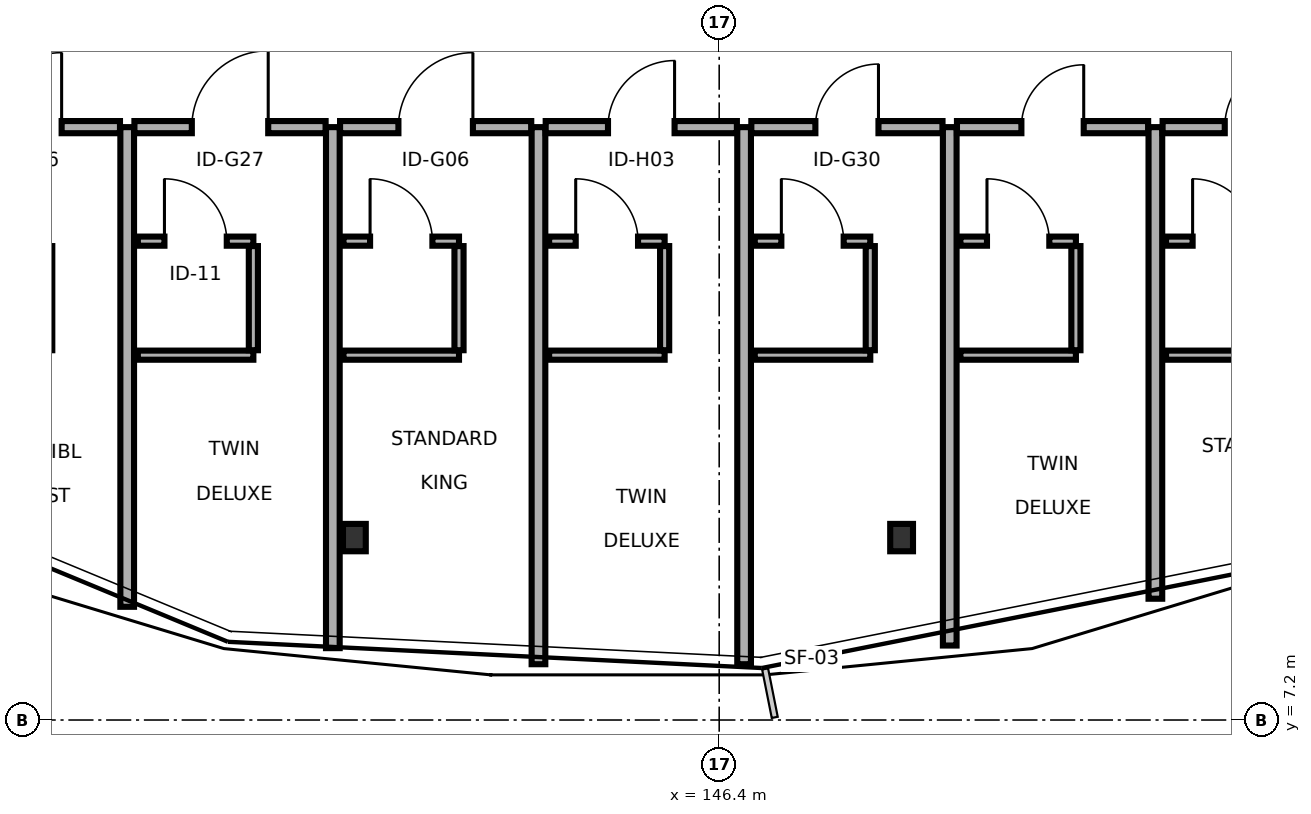
"""IFC4 building model, lengths in metres.
Left out: names, types, materials, properties, quantities, classifications, styles, units other than length and angle.
Written with IfcOpenShell. Run it as: python <this file> out.ifc"""

import sys

from ifc_helpers import new_model, si_unit, direction, frame, frame_2d, origin, origin_2d, place, context, subcontext, project, spatial, rectangle, i_section, extrude, element, fill, save


model = new_model("IFC4")
c1 = context("Model", 3, precision=1e-05, world=origin(), true_north=direction((0.0, 1.0)))
c2 = subcontext(c1, "Body", "Model", "MODEL_VIEW")
j1 = project(units=[si_unit("LENGTHUNIT", "METRE"), si_unit("PLANEANGLEUNIT", "RADIAN")], contexts=[c1])
p1 = place(None, origin())
s1 = spatial("IfcSite", under=j1, at=p1, CompositionType="ELEMENT")
p2 = place(p1, origin())
s2 = spatial("IfcBuilding", under=s1, at=p2, CompositionType="ELEMENT")
p3 = place(p2, frame((0.0, 0.0, 38.5)))
s3 = spatial("IfcBuildingStorey", under=s2, at=p3, CompositionType="ELEMENT", Elevation=38.5)
for number, where, z_axis, x_axis in (
    (1, (141.6, 9.6, 0.0), (0.0, 0.0, 1.0), (1.0, 0.0, 0.0)),
    (2, (148.8, 9.6, 0.0), (0.0, 0.0, 1.0), (1.0, 0.0, 0.0)),
):
    element("IfcColumn", number, at=place(p3, frame(where, z_axis=z_axis, x_axis=x_axis)), inside=s3, PredefinedType="COLUMN", context=c2, shape_type="SweptSolid", body=[
        extrude(i_section(OverallWidth=0.3, OverallDepth=0.36, WebThickness=0.012, FlangeThickness=0.022, FilletRadius=0.027, at=origin_2d()), origin(), (0.0, 0.0, 1.0), 3.4),
    ])
p4 = place(p3, frame((136.0, 15.0, 0.0), z_axis=(0.0, 0.0, 1.0), x_axis=(1.0, 0.0, 0.0)))
e3 = element("IfcWall", 3, at=p4, inside=s3, PredefinedType="PARTITIONING", context=c2, shape_type="SweptSolid", body=[
    extrude(rectangle(XDim=2.516, YDim=0.16, at=frame_2d((1.258, 0.0))), origin(), (0.0, 0.0, 1.0), 2.735),
])
p5 = place(p4, frame((0.768, 0.0, 0.0)))
e4 = element("IfcOpeningElement", 4, at=p5, cuts=e3, PredefinedType="OPENING", context=c2, shape_type="SweptSolid", body=[
    extrude(rectangle(XDim=0.98, YDim=2.17, at=frame_2d((0.49, 1.085))), frame((0.0, 0.09, 0.0), z_axis=(0.0, -1.0, 0.0), x_axis=(1.0, 0.0, 0.0)), (0.0, 0.0, 1.0), 0.18),
])
p6 = place(p3, frame((137.566, 12.065, 0.0), z_axis=(0.0, 0.0, 1.0), x_axis=(0.0, 1.0, 0.0)))
e5 = element("IfcWall", 5, at=p6, inside=s3, PredefinedType="PARTITIONING", context=c2, shape_type="SweptSolid", body=[
    extrude(rectangle(XDim=1.37, YDim=0.12, at=frame_2d((0.685, 0.0))), origin(), (0.0, 0.0, 1.0), 3.15),
])
p7 = place(p3, frame((138.611, 8.689, 0.0), z_axis=(0.0, 0.0, 1.0), x_axis=(0.0, 1.0, 0.0)))
e6 = element("IfcWall", 6, at=p7, inside=s3, PredefinedType="PARTITIONING", context=c2, shape_type="SweptSolid", body=[
    extrude(rectangle(XDim=6.311, YDim=0.18, at=frame_2d((3.155, 0.0))), origin(), (0.0, 0.0, 1.0), 2.695),
])
p8 = place(p3, frame((138.706, 15.0, 0.0), z_axis=(0.0, 0.0, 1.0), x_axis=(1.0, 0.0, 0.0)))
e7 = element("IfcWall", 7, at=p8, inside=s3, PredefinedType="PARTITIONING", context=c2, shape_type="SweptSolid", body=[
    extrude(rectangle(XDim=2.516, YDim=0.16, at=frame_2d((1.258, 0.0))), origin(), (0.0, 0.0, 1.0), 3.15),
])
p9 = place(p8, frame((0.755, 0.0, 0.0)))
e8 = element("IfcOpeningElement", 8, at=p9, cuts=e7, PredefinedType="OPENING", context=c2, shape_type="SweptSolid", body=[
    extrude(rectangle(XDim=1.005, YDim=2.17, at=frame_2d((0.502, 1.085))), frame((0.0, 0.09, 0.0), z_axis=(0.0, -1.0, 0.0), x_axis=(1.0, 0.0, 0.0)), (0.0, 0.0, 1.0), 0.18),
])
p10 = place(p3, frame((138.751, 12.0, 0.0), z_axis=(0.0, 0.0, 1.0), x_axis=(1.0, 0.0, 0.0)))
e9 = element("IfcWall", 9, at=p10, inside=s3, PredefinedType="PARTITIONING", context=c2, shape_type="SweptSolid", body=[
    extrude(rectangle(XDim=1.52, YDim=0.12, at=frame_2d((0.76, 0.0))), origin(), (0.0, 0.0, 1.0), 3.15),
])
p11 = place(p3, frame((138.751, 13.5, 0.0), z_axis=(0.0, 0.0, 1.0), x_axis=(1.0, 0.0, 0.0)))
e10 = element("IfcWall", 10, at=p11, inside=s3, PredefinedType="PARTITIONING", context=c2, shape_type="SweptSolid", body=[
    extrude(rectangle(XDim=1.52, YDim=0.12, at=frame_2d((0.76, 0.0))), origin(), (0.0, 0.0, 1.0), 3.15),
])
p12 = place(p11, frame((0.35, 0.0, 0.0)))
e11 = element("IfcOpeningElement", 11, at=p12, cuts=e10, PredefinedType="OPENING", context=c2, shape_type="SweptSolid", body=[
    extrude(rectangle(XDim=0.82, YDim=2.08, at=frame_2d((0.41, 1.04))), frame((0.0, 0.07, 0.0), z_axis=(0.0, -1.0, 0.0), x_axis=(1.0, 0.0, 0.0)), (0.0, 0.0, 1.0), 0.14),
])
p13 = place(p3, frame((140.271, 12.065, 0.0), z_axis=(0.0, 0.0, 1.0), x_axis=(0.0, 1.0, 0.0)))
e12 = element("IfcWall", 12, at=p13, inside=s3, PredefinedType="PARTITIONING", context=c2, shape_type="SweptSolid", body=[
    extrude(rectangle(XDim=1.37, YDim=0.12, at=frame_2d((0.685, 0.0))), origin(), (0.0, 0.0, 1.0), 3.15),
])
p14 = place(p3, frame((141.317, 8.146, 0.0), z_axis=(0.0, 0.0, 1.0), x_axis=(0.0, 1.0, 0.0)))
e13 = element("IfcWall", 13, at=p14, inside=s3, PredefinedType="PARTITIONING", context=c2, shape_type="SweptSolid", body=[
    extrude(rectangle(XDim=6.854, YDim=0.18, at=frame_2d((3.427, 0.0))), origin(), (0.0, 0.0, 1.0), 2.695),
])
p15 = place(p3, frame((141.412, 15.0, 0.0), z_axis=(0.0, 0.0, 1.0), x_axis=(1.0, 0.0, 0.0)))
e14 = element("IfcWall", 14, at=p15, inside=s3, PredefinedType="PARTITIONING", context=c2, shape_type="SweptSolid", body=[
    extrude(rectangle(XDim=2.516, YDim=0.16, at=frame_2d((1.258, 0.0))), origin(), (0.0, 0.0, 1.0), 2.735),
])
p16 = place(p15, frame((0.768, 0.0, 0.0)))
e15 = element("IfcOpeningElement", 15, at=p16, cuts=e14, PredefinedType="OPENING", context=c2, shape_type="SweptSolid", body=[
    extrude(rectangle(XDim=0.98, YDim=2.05, at=frame_2d((0.49, 1.025))), frame((0.0, 0.09, 0.0), z_axis=(0.0, -1.0, 0.0), x_axis=(1.0, 0.0, 0.0)), (0.0, 0.0, 1.0), 0.18),
])
p17 = place(p3, frame((141.457, 12.0, 0.0), z_axis=(0.0, 0.0, 1.0), x_axis=(1.0, 0.0, 0.0)))
e16 = element("IfcWall", 16, at=p17, inside=s3, PredefinedType="PARTITIONING", context=c2, shape_type="SweptSolid", body=[
    extrude(rectangle(XDim=1.52, YDim=0.12, at=frame_2d((0.76, 0.0))), origin(), (0.0, 0.0, 1.0), 2.735),
])
p18 = place(p3, frame((141.457, 13.5, 0.0), z_axis=(0.0, 0.0, 1.0), x_axis=(1.0, 0.0, 0.0)))
e17 = element("IfcWall", 17, at=p18, inside=s3, PredefinedType="PARTITIONING", context=c2, shape_type="SweptSolid", body=[
    extrude(rectangle(XDim=1.52, YDim=0.12, at=frame_2d((0.76, 0.0))), origin(), (0.0, 0.0, 1.0), 2.735),
])
p19 = place(p18, frame((0.35, 0.0, 0.0)))
e18 = element("IfcOpeningElement", 18, at=p19, cuts=e17, PredefinedType="OPENING", context=c2, shape_type="SweptSolid", body=[
    extrude(rectangle(XDim=0.82, YDim=2.08, at=frame_2d((0.41, 1.04))), frame((0.0, 0.07, 0.0), z_axis=(0.0, -1.0, 0.0), x_axis=(1.0, 0.0, 0.0)), (0.0, 0.0, 1.0), 0.14),
])
p20 = place(p3, frame((142.977, 12.065, 0.0), z_axis=(0.0, 0.0, 1.0), x_axis=(0.0, 1.0, 0.0)))
e19 = element("IfcWall", 19, at=p20, inside=s3, PredefinedType="PARTITIONING", context=c2, shape_type="SweptSolid", body=[
    extrude(rectangle(XDim=1.37, YDim=0.12, at=frame_2d((0.685, 0.0))), origin(), (0.0, 0.0, 1.0), 3.15),
])
p21 = place(p3, frame((144.022, 7.934, 0.0), z_axis=(0.0, 0.0, 1.0), x_axis=(0.0, 1.0, 0.0)))
e20 = element("IfcWall", 20, at=p21, inside=s3, PredefinedType="PARTITIONING", context=c2, shape_type="SweptSolid", body=[
    extrude(rectangle(XDim=7.066, YDim=0.18, at=frame_2d((3.533, 0.0))), origin(), (0.0, 0.0, 1.0), 2.695),
])
p22 = place(p3, frame((144.117, 15.0, 0.0), z_axis=(0.0, 0.0, 1.0), x_axis=(1.0, 0.0, 0.0)))
e21 = element("IfcWall", 21, at=p22, inside=s3, PredefinedType="PARTITIONING", context=c2, shape_type="SweptSolid", body=[
    extrude(rectangle(XDim=2.516, YDim=0.16, at=frame_2d((1.258, 0.0))), origin(), (0.0, 0.0, 1.0), 3.15),
])
p23 = place(p22, frame((0.82, 0.0, 0.0)))
e22 = element("IfcOpeningElement", 22, at=p23, cuts=e21, PredefinedType="OPENING", context=c2, shape_type="SweptSolid", body=[
    extrude(rectangle(XDim=0.876, YDim=2.16, at=frame_2d((0.438, 1.08))), frame((0.0, 0.09, 0.0), z_axis=(0.0, -1.0, 0.0), x_axis=(1.0, 0.0, 0.0)), (0.0, 0.0, 1.0), 0.18),
])
p24 = place(p3, frame((144.162, 12.0, 0.0), z_axis=(0.0, 0.0, 1.0), x_axis=(1.0, 0.0, 0.0)))
e23 = element("IfcWall", 23, at=p24, inside=s3, PredefinedType="PARTITIONING", context=c2, shape_type="SweptSolid", body=[
    extrude(rectangle(XDim=1.52, YDim=0.12, at=frame_2d((0.76, 0.0))), origin(), (0.0, 0.0, 1.0), 3.15),
])
p25 = place(p3, frame((144.162, 13.5, 0.0), z_axis=(0.0, 0.0, 1.0), x_axis=(1.0, 0.0, 0.0)))
e24 = element("IfcWall", 24, at=p25, inside=s3, PredefinedType="PARTITIONING", context=c2, shape_type="SweptSolid", body=[
    extrude(rectangle(XDim=1.52, YDim=0.12, at=frame_2d((0.76, 0.0))), origin(), (0.0, 0.0, 1.0), 3.15),
])
p26 = place(p25, frame((0.35, 0.0, 0.0)))
e25 = element("IfcOpeningElement", 25, at=p26, cuts=e24, PredefinedType="OPENING", context=c2, shape_type="SweptSolid", body=[
    extrude(rectangle(XDim=0.82, YDim=2.08, at=frame_2d((0.41, 1.04))), frame((0.0, 0.07, 0.0), z_axis=(0.0, -1.0, 0.0), x_axis=(1.0, 0.0, 0.0)), (0.0, 0.0, 1.0), 0.14),
])
p27 = place(p3, frame((145.682, 12.065, 0.0), z_axis=(0.0, 0.0, 1.0), x_axis=(0.0, 1.0, 0.0)))
e26 = element("IfcWall", 26, at=p27, inside=s3, PredefinedType="PARTITIONING", context=c2, shape_type="SweptSolid", body=[
    extrude(rectangle(XDim=1.37, YDim=0.12, at=frame_2d((0.685, 0.0))), origin(), (0.0, 0.0, 1.0), 3.15),
])
p28 = place(p3, frame((146.728, 7.934, 0.0), z_axis=(0.0, 0.0, 1.0), x_axis=(0.0, 1.0, 0.0)))
e27 = element("IfcWall", 27, at=p28, inside=s3, PredefinedType="PARTITIONING", context=c2, shape_type="SweptSolid", body=[
    extrude(rectangle(XDim=7.066, YDim=0.18, at=frame_2d((3.533, 0.0))), origin(), (0.0, 0.0, 1.0), 2.695),
])
p29 = place(p3, frame((146.823, 15.0, 0.0), z_axis=(0.0, 0.0, 1.0), x_axis=(1.0, 0.0, 0.0)))
e28 = element("IfcWall", 28, at=p29, inside=s3, PredefinedType="PARTITIONING", context=c2, shape_type="SweptSolid", body=[
    extrude(rectangle(XDim=2.516, YDim=0.16, at=frame_2d((1.258, 0.0))), origin(), (0.0, 0.0, 1.0), 2.735),
])
p30 = place(p29, frame((0.843, 0.0, 0.0)))
e29 = element("IfcOpeningElement", 29, at=p30, cuts=e28, PredefinedType="OPENING", context=c2, shape_type="SweptSolid", body=[
    extrude(rectangle(XDim=0.83, YDim=2.23, at=frame_2d((0.415, 1.115))), frame((0.0, 0.09, 0.0), z_axis=(0.0, -1.0, 0.0), x_axis=(1.0, 0.0, 0.0)), (0.0, 0.0, 1.0), 0.18),
])
p31 = place(p3, frame((146.868, 12.0, 0.0), z_axis=(0.0, 0.0, 1.0), x_axis=(1.0, 0.0, 0.0)))
e30 = element("IfcWall", 30, at=p31, inside=s3, PredefinedType="PARTITIONING", context=c2, shape_type="SweptSolid", body=[
    extrude(rectangle(XDim=1.52, YDim=0.12, at=frame_2d((0.76, 0.0))), origin(), (0.0, 0.0, 1.0), 3.15),
])
p32 = place(p3, frame((146.868, 13.5, 0.0), z_axis=(0.0, 0.0, 1.0), x_axis=(1.0, 0.0, 0.0)))
e31 = element("IfcWall", 31, at=p32, inside=s3, PredefinedType="PARTITIONING", context=c2, shape_type="SweptSolid", body=[
    extrude(rectangle(XDim=1.52, YDim=0.12, at=frame_2d((0.76, 0.0))), origin(), (0.0, 0.0, 1.0), 3.15),
])
p33 = place(p32, frame((0.35, 0.0, 0.0)))
e32 = element("IfcOpeningElement", 32, at=p33, cuts=e31, PredefinedType="OPENING", context=c2, shape_type="SweptSolid", body=[
    extrude(rectangle(XDim=0.82, YDim=2.08, at=frame_2d((0.41, 1.04))), frame((0.0, 0.07, 0.0), z_axis=(0.0, -1.0, 0.0), x_axis=(1.0, 0.0, 0.0)), (0.0, 0.0, 1.0), 0.14),
])
p34 = place(p3, frame((148.388, 12.065, 0.0), z_axis=(0.0, 0.0, 1.0), x_axis=(0.0, 1.0, 0.0)))
e33 = element("IfcWall", 33, at=p34, inside=s3, PredefinedType="PARTITIONING", context=c2, shape_type="SweptSolid", body=[
    extrude(rectangle(XDim=1.37, YDim=0.12, at=frame_2d((0.685, 0.0))), origin(), (0.0, 0.0, 1.0), 3.15),
])
p35 = place(p3, frame((149.433, 8.18, 0.0), z_axis=(0.0, 0.0, 1.0), x_axis=(0.0, 1.0, 0.0)))
e34 = element("IfcWall", 34, at=p35, inside=s3, PredefinedType="PARTITIONING", context=c2, shape_type="SweptSolid", body=[
    extrude(rectangle(XDim=6.82, YDim=0.18, at=frame_2d((3.41, 0.0))), origin(), (0.0, 0.0, 1.0), 2.695),
])
p36 = place(p3, frame((149.528, 15.0, 0.0), z_axis=(0.0, 0.0, 1.0), x_axis=(1.0, 0.0, 0.0)))
e35 = element("IfcWall", 35, at=p36, inside=s3, PredefinedType="PARTITIONING", context=c2, shape_type="SweptSolid", body=[
    extrude(rectangle(XDim=2.516, YDim=0.16, at=frame_2d((1.258, 0.0))), origin(), (0.0, 0.0, 1.0), 3.15),
])
p37 = place(p36, frame((0.848, 0.0, 0.0)))
e36 = element("IfcOpeningElement", 36, at=p37, cuts=e35, PredefinedType="OPENING", context=c2, shape_type="SweptSolid", body=[
    extrude(rectangle(XDim=0.82, YDim=2.08, at=frame_2d((0.41, 1.04))), frame((0.0, 0.09, 0.0), z_axis=(0.0, -1.0, 0.0), x_axis=(1.0, 0.0, 0.0)), (0.0, 0.0, 1.0), 0.18),
])
p38 = place(p3, frame((149.573, 12.0, 0.0), z_axis=(0.0, 0.0, 1.0), x_axis=(1.0, 0.0, 0.0)))
e37 = element("IfcWall", 37, at=p38, inside=s3, PredefinedType="PARTITIONING", context=c2, shape_type="SweptSolid", body=[
    extrude(rectangle(XDim=1.52, YDim=0.12, at=frame_2d((0.76, 0.0))), origin(), (0.0, 0.0, 1.0), 3.15),
])
p39 = place(p3, frame((149.573, 13.5, 0.0), z_axis=(0.0, 0.0, 1.0), x_axis=(1.0, 0.0, 0.0)))
e38 = element("IfcWall", 38, at=p39, inside=s3, PredefinedType="PARTITIONING", context=c2, shape_type="SweptSolid", body=[
    extrude(rectangle(XDim=1.52, YDim=0.12, at=frame_2d((0.76, 0.0))), origin(), (0.0, 0.0, 1.0), 3.15),
])
p40 = place(p39, frame((0.35, 0.0, 0.0)))
e39 = element("IfcOpeningElement", 39, at=p40, cuts=e38, PredefinedType="OPENING", context=c2, shape_type="SweptSolid", body=[
    extrude(rectangle(XDim=0.82, YDim=2.08, at=frame_2d((0.41, 1.04))), frame((0.0, 0.07, 0.0), z_axis=(0.0, -1.0, 0.0), x_axis=(1.0, 0.0, 0.0)), (0.0, 0.0, 1.0), 0.14),
])
p41 = place(p3, frame((151.093, 12.065, 0.0), z_axis=(0.0, 0.0, 1.0), x_axis=(0.0, 1.0, 0.0)))
e40 = element("IfcWall", 40, at=p41, inside=s3, PredefinedType="PARTITIONING", context=c2, shape_type="SweptSolid", body=[
    extrude(rectangle(XDim=1.37, YDim=0.12, at=frame_2d((0.685, 0.0))), origin(), (0.0, 0.0, 1.0), 3.15),
])
p42 = place(p3, frame((152.139, 8.796, 0.0), z_axis=(0.0, 0.0, 1.0), x_axis=(0.0, 1.0, 0.0)))
e41 = element("IfcWall", 41, at=p42, inside=s3, PredefinedType="PARTITIONING", context=c2, shape_type="SweptSolid", body=[
    extrude(rectangle(XDim=6.204, YDim=0.18, at=frame_2d((3.102, 0.0))), origin(), (0.0, 0.0, 1.0), 2.695),
])
p43 = place(p3, frame((152.234, 15.0, 0.0), z_axis=(0.0, 0.0, 1.0), x_axis=(1.0, 0.0, 0.0)))
e42 = element("IfcWall", 42, at=p43, inside=s3, PredefinedType="PARTITIONING", context=c2, shape_type="SweptSolid", body=[
    extrude(rectangle(XDim=2.516, YDim=0.16, at=frame_2d((1.258, 0.0))), origin(), (0.0, 0.0, 1.0), 3.15),
])
p44 = place(p43, frame((0.818, 0.0, 0.0)))
e43 = element("IfcOpeningElement", 43, at=p44, cuts=e42, PredefinedType="OPENING", context=c2, shape_type="SweptSolid", body=[
    extrude(rectangle(XDim=0.88, YDim=2.12, at=frame_2d((0.44, 1.06))), frame((0.0, 0.09, 0.0), z_axis=(0.0, -1.0, 0.0), x_axis=(1.0, 0.0, 0.0)), (0.0, 0.0, 1.0), 0.18),
])
p45 = place(p3, frame((152.279, 12.0, 0.0), z_axis=(0.0, 0.0, 1.0), x_axis=(1.0, 0.0, 0.0)))
e44 = element("IfcWall", 44, at=p45, inside=s3, PredefinedType="PARTITIONING", context=c2, shape_type="SweptSolid", body=[
    extrude(rectangle(XDim=1.52, YDim=0.12, at=frame_2d((0.76, 0.0))), origin(), (0.0, 0.0, 1.0), 3.15),
])
p46 = place(p3, frame((152.279, 13.5, 0.0), z_axis=(0.0, 0.0, 1.0), x_axis=(1.0, 0.0, 0.0)))
e45 = element("IfcWall", 45, at=p46, inside=s3, PredefinedType="PARTITIONING", context=c2, shape_type="SweptSolid", body=[
    extrude(rectangle(XDim=1.52, YDim=0.12, at=frame_2d((0.76, 0.0))), origin(), (0.0, 0.0, 1.0), 3.15),
])
p47 = place(p46, frame((0.35, 0.0, 0.0)))
e46 = element("IfcOpeningElement", 46, at=p47, cuts=e45, PredefinedType="OPENING", context=c2, shape_type="SweptSolid", body=[
    extrude(rectangle(XDim=0.82, YDim=2.08, at=frame_2d((0.41, 1.04))), frame((0.0, 0.07, 0.0), z_axis=(0.0, -1.0, 0.0), x_axis=(1.0, 0.0, 0.0)), (0.0, 0.0, 1.0), 0.14),
])
p48 = place(p5, origin())
e47 = element("IfcDoor", 47, at=p48, inside=s3, OperationType="SINGLE_SWING_RIGHT", PredefinedType="DOOR", context=c2, shape_type="SweptSolid", body=[
    extrude(rectangle(XDim=0.98, YDim=2.17, at=frame_2d((0.49, 1.085))), frame((0.0, 0.025, 0.0), z_axis=(0.0, -1.0, 0.0), x_axis=(1.0, 0.0, 0.0)), (0.0, 0.0, 1.0), 0.05),
])
fill(e4, e47)
p49 = place(p9, origin())
e48 = element("IfcDoor", 48, at=p49, inside=s3, OperationType="SINGLE_SWING_RIGHT", PredefinedType="DOOR", context=c2, shape_type="SweptSolid", body=[
    extrude(rectangle(XDim=1.005, YDim=2.17, at=frame_2d((0.502, 1.085))), frame((0.0, 0.025, 0.0), z_axis=(0.0, -1.0, 0.0), x_axis=(1.0, 0.0, 0.0)), (0.0, 0.0, 1.0), 0.05),
])
fill(e8, e48)
p50 = place(p12, origin())
e49 = element("IfcDoor", 49, at=p50, inside=s3, OperationType="SINGLE_SWING_LEFT", PredefinedType="DOOR", context=c2, shape_type="SweptSolid", body=[
    extrude(rectangle(XDim=0.82, YDim=2.08, at=frame_2d((0.41, 1.04))), frame((0.0, 0.025, 0.0), z_axis=(0.0, -1.0, 0.0), x_axis=(1.0, 0.0, 0.0)), (0.0, 0.0, 1.0), 0.05),
])
fill(e11, e49)
p51 = place(p16, origin())
e50 = element("IfcDoor", 50, at=p51, inside=s3, OperationType="SINGLE_SWING_RIGHT", PredefinedType="DOOR", context=c2, shape_type="SweptSolid", body=[
    extrude(rectangle(XDim=0.98, YDim=2.05, at=frame_2d((0.49, 1.025))), frame((0.0, 0.025, 0.0), z_axis=(0.0, -1.0, 0.0), x_axis=(1.0, 0.0, 0.0)), (0.0, 0.0, 1.0), 0.05),
])
fill(e15, e50)
p52 = place(p19, origin())
e51 = element("IfcDoor", 51, at=p52, inside=s3, OperationType="SINGLE_SWING_LEFT", PredefinedType="DOOR", context=c2, shape_type="SweptSolid", body=[
    extrude(rectangle(XDim=0.82, YDim=2.08, at=frame_2d((0.41, 1.04))), frame((0.0, 0.025, 0.0), z_axis=(0.0, -1.0, 0.0), x_axis=(1.0, 0.0, 0.0)), (0.0, 0.0, 1.0), 0.05),
])
fill(e18, e51)
p53 = place(p23, origin())
e52 = element("IfcDoor", 52, at=p53, inside=s3, OperationType="SINGLE_SWING_RIGHT", PredefinedType="DOOR", context=c2, shape_type="SweptSolid", body=[
    extrude(rectangle(XDim=0.876, YDim=2.16, at=frame_2d((0.438, 1.08))), frame((0.0, 0.025, 0.0), z_axis=(0.0, -1.0, 0.0), x_axis=(1.0, 0.0, 0.0)), (0.0, 0.0, 1.0), 0.05),
])
fill(e22, e52)
p54 = place(p26, origin())
e53 = element("IfcDoor", 53, at=p54, inside=s3, OperationType="SINGLE_SWING_LEFT", PredefinedType="DOOR", context=c2, shape_type="SweptSolid", body=[
    extrude(rectangle(XDim=0.82, YDim=2.08, at=frame_2d((0.41, 1.04))), frame((0.0, 0.025, 0.0), z_axis=(0.0, -1.0, 0.0), x_axis=(1.0, 0.0, 0.0)), (0.0, 0.0, 1.0), 0.05),
])
fill(e25, e53)
p55 = place(p30, origin())
e54 = element("IfcDoor", 54, at=p55, inside=s3, OperationType="SINGLE_SWING_RIGHT", PredefinedType="DOOR", context=c2, shape_type="SweptSolid", body=[
    extrude(rectangle(XDim=0.83, YDim=2.23, at=frame_2d((0.415, 1.115))), frame((0.0, 0.025, 0.0), z_axis=(0.0, -1.0, 0.0), x_axis=(1.0, 0.0, 0.0)), (0.0, 0.0, 1.0), 0.05),
])
fill(e29, e54)
p56 = place(p33, origin())
e55 = element("IfcDoor", 55, at=p56, inside=s3, OperationType="SINGLE_SWING_LEFT", PredefinedType="DOOR", context=c2, shape_type="SweptSolid", body=[
    extrude(rectangle(XDim=0.82, YDim=2.08, at=frame_2d((0.41, 1.04))), frame((0.0, 0.025, 0.0), z_axis=(0.0, -1.0, 0.0), x_axis=(1.0, 0.0, 0.0)), (0.0, 0.0, 1.0), 0.05),
])
fill(e32, e55)
p57 = place(p37, origin())
e56 = element("IfcDoor", 56, at=p57, inside=s3, OperationType="SINGLE_SWING_RIGHT", PredefinedType="DOOR", context=c2, shape_type="SweptSolid", body=[
    extrude(rectangle(XDim=0.82, YDim=2.08, at=frame_2d((0.41, 1.04))), frame((0.0, 0.025, 0.0), z_axis=(0.0, -1.0, 0.0), x_axis=(1.0, 0.0, 0.0)), (0.0, 0.0, 1.0), 0.05),
])
fill(e36, e56)
p58 = place(p40, origin())
e57 = element("IfcDoor", 57, at=p58, inside=s3, OperationType="SINGLE_SWING_LEFT", PredefinedType="DOOR", context=c2, shape_type="SweptSolid", body=[
    extrude(rectangle(XDim=0.82, YDim=2.08, at=frame_2d((0.41, 1.04))), frame((0.0, 0.025, 0.0), z_axis=(0.0, -1.0, 0.0), x_axis=(1.0, 0.0, 0.0)), (0.0, 0.0, 1.0), 0.05),
])
fill(e39, e57)
p59 = place(p44, origin())
e58 = element("IfcDoor", 58, at=p59, inside=s3, OperationType="SINGLE_SWING_RIGHT", PredefinedType="DOOR", context=c2, shape_type="SweptSolid", body=[
    extrude(rectangle(XDim=0.88, YDim=2.12, at=frame_2d((0.44, 1.06))), frame((0.0, 0.025, 0.0), z_axis=(0.0, -1.0, 0.0), x_axis=(1.0, 0.0, 0.0)), (0.0, 0.0, 1.0), 0.05),
])
fill(e43, e58)
p60 = place(p47, origin())
e59 = element("IfcDoor", 59, at=p60, inside=s3, OperationType="SINGLE_SWING_LEFT", PredefinedType="DOOR", context=c2, shape_type="SweptSolid", body=[
    extrude(rectangle(XDim=0.82, YDim=2.08, at=frame_2d((0.41, 1.04))), frame((0.0, 0.025, 0.0), z_axis=(0.0, -1.0, 0.0), x_axis=(1.0, 0.0, 0.0)), (0.0, 0.0, 1.0), 0.05),
])
fill(e46, e59)
save(model, sys.argv[1])
